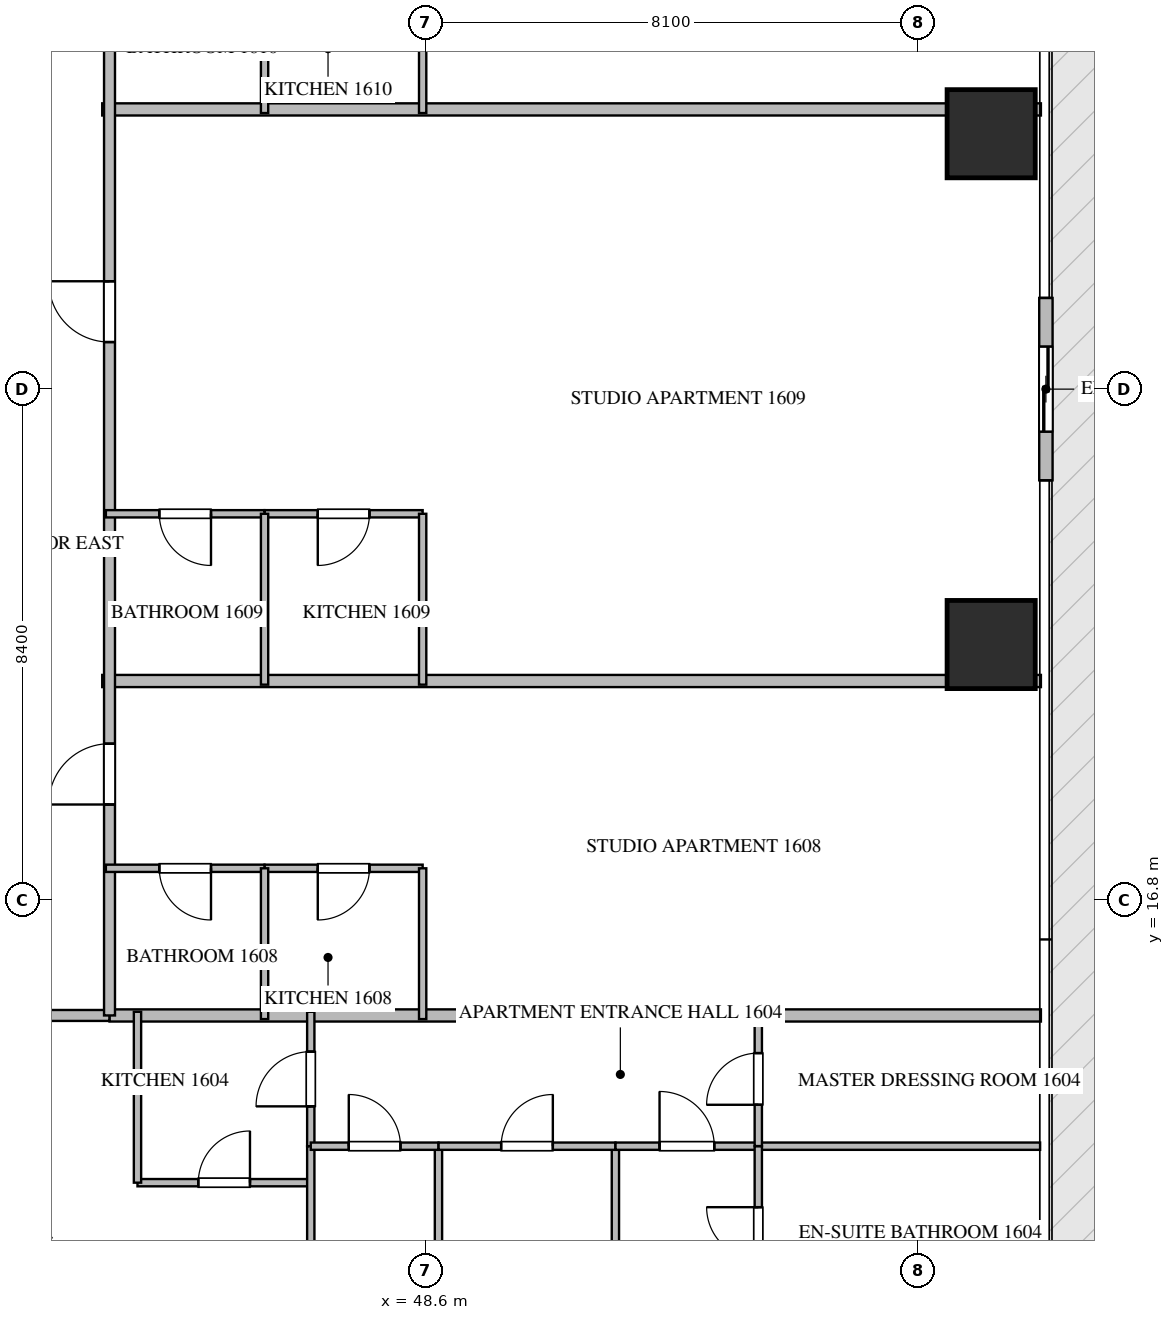
"""IFC4 building model, lengths in metres.
Left out: names, types, materials, properties, quantities, classifications, styles, units other than length and angle.
Written with IfcOpenShell. Run it as: python <this file> out.ifc"""

import sys

from ifc_helpers import new_model, si_unit, direction, frame, frame_2d, origin, origin_2d, place, context, subcontext, project, spatial, rectangle, extrude, source, transform, mapped, element, fill, save


model = new_model("IFC4")
c1 = context("Model", 3, precision=1e-05, world=origin(), true_north=direction((0.0, 1.0)))
c2 = subcontext(c1, "Body", "Model", "MODEL_VIEW")
j1 = project(units=[si_unit("LENGTHUNIT", "METRE"), si_unit("PLANEANGLEUNIT", "RADIAN")], contexts=[c1])
p1 = place(None, origin())
s1 = spatial("IfcSite", under=j1, at=p1, CompositionType="ELEMENT")
p2 = place(p1, origin())
s2 = spatial("IfcBuilding", under=s1, at=p2, CompositionType="ELEMENT")
p3 = place(p2, frame((0.0, 0.0, 67.95)))
s3 = spatial("IfcBuildingStorey", under=s2, at=p3, CompositionType="ELEMENT", Elevation=67.95)
m1 = source(origin(), c2, "Body", "SweptSolid", [
    extrude(rectangle(XDim=1.45, YDim=1.45, at=origin_2d()), origin(), (0.0, 0.0, 1.0), 3.75),
])
for number, where, z_axis, x_axis in (
    (1, (57.9, 21.0, -0.26), (0.0, 0.0, 1.0), (1.0, 0.0, 0.0)),
    (2, (57.9, 29.4, -0.26), (0.0, 0.0, 1.0), (1.0, 0.0, 0.0)),
):
    element("IfcColumn", number, at=place(p3, frame(where, z_axis=z_axis, x_axis=x_axis)), inside=s3, PredefinedType="COLUMN", context=c2, shape_type="MappedRepresentation", body=[
        mapped(m1, transform((0.0, 0.0, 0.0), scale=1.0)),
    ])
p4 = place(p3, frame((58.8, 23.7, 0.0), z_axis=(0.0, 0.0, 1.0), x_axis=(0.0, 1.0, 0.0)))
e3 = element("IfcWall", 3, at=p4, inside=s3, PredefinedType="ELEMENTEDWALL", context=c2, shape_type="SweptSolid", body=[
    extrude(rectangle(XDim=3.0, YDim=0.22, at=frame_2d((1.5, 0.0))), origin(), (0.0, 0.0, 1.0), 3.475),
])
p5 = place(p4, frame((0.8, 0.0, 0.0)))
e4 = element("IfcOpeningElement", 4, at=p5, cuts=e3, PredefinedType="OPENING", context=c2, shape_type="SweptSolid", body=[
    extrude(rectangle(XDim=1.4, YDim=2.25, at=frame_2d((0.7, 1.125))), frame((0.0, 0.12, 0.0), z_axis=(0.0, -1.0, 0.0), x_axis=(1.0, 0.0, 0.0)), (0.0, 0.0, 1.0), 0.24),
])
for number, where, z_axis, x_axis in (
    (5, (43.28, 20.4, 0.0), (0.0, 0.0, 1.0), (1.0, 0.0, 0.0)),
    (6, (43.28, 29.8, 0.0), (0.0, 0.0, 1.0), (1.0, 0.0, 0.0)),
):
    element("IfcWall", number, at=place(p3, frame(where, z_axis=z_axis, x_axis=x_axis)), inside=s3, PredefinedType="PARTITIONING", context=c2, shape_type="SweptSolid", body=[
        extrude(rectangle(XDim=15.438, YDim=0.2, at=frame_2d((7.719, 0.0))), origin(), (0.0, 0.0, 1.0), 3.49),
    ])
p6 = place(p3, frame((43.4, 14.9, 0.0), z_axis=(0.0, 0.0, 1.0), x_axis=(1.0, 0.0, 0.0)))
e7 = element("IfcWall", 7, at=p6, inside=s3, PredefinedType="PARTITIONING", context=c2, shape_type="SweptSolid", body=[
    extrude(rectangle(XDim=15.318, YDim=0.2, at=frame_2d((7.659, 0.0))), origin(), (0.0, 0.0, 1.0), 3.49),
])
p7 = place(p3, frame((21.402, 14.9, 0.0), z_axis=(0.0, 0.0, 1.0), x_axis=(1.0, 0.0, 0.0)))
e8 = element("IfcWall", 8, at=p7, inside=s3, PredefinedType="PARTITIONING", context=c2, shape_type="SweptSolid", body=[
    extrude(rectangle(XDim=21.996, YDim=0.18, at=frame_2d((10.998, 0.0))), origin(), (0.0, 0.0, 1.0), 3.49),
])
p8 = place(p7, frame((1.96, 0.0, 0.0)))
e9 = element("IfcOpeningElement", 9, at=p8, cuts=e8, PredefinedType="OPENING", context=c2, shape_type="SweptSolid", body=[
    extrude(rectangle(XDim=1.0, YDim=2.15, at=frame_2d((0.5, 1.075))), frame((0.0, 0.1, 0.0), z_axis=(0.0, -1.0, 0.0), x_axis=(1.0, 0.0, 0.0)), (0.0, 0.0, 1.0), 0.2),
])
p9 = place(p7, frame((5.249, 0.0, 0.0)))
e10 = element("IfcOpeningElement", 10, at=p9, cuts=e8, PredefinedType="OPENING", context=c2, shape_type="SweptSolid", body=[
    extrude(rectangle(XDim=1.0, YDim=2.15, at=frame_2d((0.5, 1.075))), frame((0.0, 0.1, 0.0), z_axis=(0.0, -1.0, 0.0), x_axis=(1.0, 0.0, 0.0)), (0.0, 0.0, 1.0), 0.2),
])
p10 = place(p7, frame((11.653, 0.0, 0.0)))
e11 = element("IfcOpeningElement", 11, at=p10, cuts=e8, PredefinedType="OPENING", context=c2, shape_type="SweptSolid", body=[
    extrude(rectangle(XDim=1.0, YDim=2.15, at=frame_2d((0.5, 1.075))), frame((0.0, 0.1, 0.0), z_axis=(0.0, -1.0, 0.0), x_axis=(1.0, 0.0, 0.0)), (0.0, 0.0, 1.0), 0.2),
])
p11 = place(p7, frame((18.896, 0.0, 0.0)))
e12 = element("IfcOpeningElement", 12, at=p11, cuts=e8, PredefinedType="OPENING", context=c2, shape_type="SweptSolid", body=[
    extrude(rectangle(XDim=1.0, YDim=2.15, at=frame_2d((0.5, 1.075))), frame((0.0, 0.1, 0.0), z_axis=(0.0, -1.0, 0.0), x_axis=(1.0, 0.0, 0.0)), (0.0, 0.0, 1.0), 0.2),
])
p12 = place(p3, frame((43.4, 14.9, 0.0), z_axis=(0.0, 0.0, 1.0), x_axis=(0.0, 1.0, 0.0)))
e13 = element("IfcWall", 13, at=p12, inside=s3, PredefinedType="PARTITIONING", context=c2, shape_type="SweptSolid", body=[
    extrude(rectangle(XDim=20.6, YDim=0.18, at=frame_2d((10.3, 0.0))), origin(), (0.0, 0.0, 1.0), 3.49),
])
p13 = place(p12, frame((3.469, 0.0, 0.0)))
e14 = element("IfcOpeningElement", 14, at=p13, cuts=e13, PredefinedType="OPENING", context=c2, shape_type="SweptSolid", body=[
    extrude(rectangle(XDim=1.0, YDim=2.15, at=frame_2d((0.5, 1.075))), frame((0.0, 0.1, 0.0), z_axis=(0.0, -1.0, 0.0), x_axis=(1.0, 0.0, 0.0)), (0.0, 0.0, 1.0), 0.2),
])
p14 = place(p12, frame((11.074, 0.0, 0.0)))
e15 = element("IfcOpeningElement", 15, at=p14, cuts=e13, PredefinedType="OPENING", context=c2, shape_type="SweptSolid", body=[
    extrude(rectangle(XDim=1.0, YDim=2.15, at=frame_2d((0.5, 1.075))), frame((0.0, 0.1, 0.0), z_axis=(0.0, -1.0, 0.0), x_axis=(1.0, 0.0, 0.0)), (0.0, 0.0, 1.0), 0.2),
])
p15 = place(p12, frame((17.78, 0.0, 0.0)))
e16 = element("IfcOpeningElement", 16, at=p15, cuts=e13, PredefinedType="OPENING", context=c2, shape_type="SweptSolid", body=[
    extrude(rectangle(XDim=1.0, YDim=2.15, at=frame_2d((0.5, 1.075))), frame((0.0, 0.1, 0.0), z_axis=(0.0, -1.0, 0.0), x_axis=(1.0, 0.0, 0.0)), (0.0, 0.0, 1.0), 0.2),
])
p16 = place(p3, frame((43.86, 12.15, 0.0), z_axis=(0.0, 0.0, 1.0), x_axis=(1.0, 0.0, 0.0)))
e17 = element("IfcWall", 17, at=p16, inside=s3, PredefinedType="PARTITIONING", context=c2, shape_type="SweptSolid", body=[
    extrude(rectangle(XDim=2.85, YDim=0.12, at=frame_2d((1.425, 0.0))), origin(), (0.0, 0.0, 1.0), 3.49),
])
p17 = place(p16, frame((1.0, 0.0, 0.0)))
e18 = element("IfcOpeningElement", 18, at=p17, cuts=e17, PredefinedType="OPENING", context=c2, shape_type="SweptSolid", body=[
    extrude(rectangle(XDim=0.85, YDim=2.1, at=frame_2d((0.425, 1.05))), frame((0.0, 0.07, 0.0), z_axis=(0.0, -1.0, 0.0), x_axis=(1.0, 0.0, 0.0)), (0.0, 0.0, 1.0), 0.14),
])
p18 = place(p3, frame((43.86, 12.15, 0.0), z_axis=(0.0, 0.0, 1.0), x_axis=(0.0, 1.0, 0.0)))
e19 = element("IfcWall", 19, at=p18, inside=s3, PredefinedType="PARTITIONING", context=c2, shape_type="SweptSolid", body=[
    extrude(rectangle(XDim=2.81, YDim=0.12, at=frame_2d((1.405, 0.0))), origin(), (0.0, 0.0, 1.0), 3.49),
])
p19 = place(p3, frame((46.71, 12.75, 0.0), z_axis=(0.0, 0.0, 1.0), x_axis=(0.0, 1.0, 0.0)))
e20 = element("IfcWall", 20, at=p19, inside=s3, PredefinedType="PARTITIONING", context=c2, shape_type="SweptSolid", body=[
    extrude(rectangle(XDim=2.21, YDim=0.12, at=frame_2d((1.105, 0.0))), origin(), (0.0, 0.0, 1.0), 3.49),
])
p20 = place(p19, frame((0.655, 0.0, 0.0)))
e21 = element("IfcOpeningElement", 21, at=p20, cuts=e20, PredefinedType="OPENING", context=c2, shape_type="SweptSolid", body=[
    extrude(rectangle(XDim=0.9, YDim=2.1, at=frame_2d((0.45, 1.05))), frame((0.0, 0.07, 0.0), z_axis=(0.0, -1.0, 0.0), x_axis=(1.0, 0.0, 0.0)), (0.0, 0.0, 1.0), 0.14),
])
p21 = place(p3, frame((46.71, 5.607, 0.0), z_axis=(0.0, 0.0, 1.0), x_axis=(0.0, 1.0, 0.0)))
e22 = element("IfcWall", 22, at=p21, inside=s3, PredefinedType="PARTITIONING", context=c2, shape_type="SweptSolid", body=[
    extrude(rectangle(XDim=7.141, YDim=0.12, at=frame_2d((3.571, 0.0))), origin(), (0.0, 0.0, 1.0), 3.49),
])
p22 = place(p3, frame((51.72, 4.495, 0.0), z_axis=(0.0, 0.0, 1.0), x_axis=(0.0, 1.0, 0.0)))
e23 = element("IfcWall", 23, at=p22, inside=s3, PredefinedType="PARTITIONING", context=c2, shape_type="SweptSolid", body=[
    extrude(rectangle(XDim=8.255, YDim=0.12, at=frame_2d((4.127, 0.0))), origin(), (0.0, 0.0, 1.0), 3.49),
])
p23 = place(p3, frame((48.81, 5.605, 0.0), z_axis=(0.0, 0.0, 1.0), x_axis=(0.0, 1.0, 0.0)))
e24 = element("IfcWall", 24, at=p23, inside=s3, PredefinedType="PARTITIONING", context=c2, shape_type="SweptSolid", body=[
    extrude(rectangle(XDim=7.145, YDim=0.12, at=frame_2d((3.573, 0.0))), origin(), (0.0, 0.0, 1.0), 3.49),
])
p24 = place(p3, frame((46.71, 12.75, 0.0), z_axis=(0.0, 0.0, 1.0), x_axis=(1.0, 0.0, 0.0)))
e25 = element("IfcWall", 25, at=p24, inside=s3, PredefinedType="PARTITIONING", context=c2, shape_type="SweptSolid", body=[
    extrude(rectangle(XDim=2.1, YDim=0.12, at=frame_2d((1.05, 0.0))), origin(), (0.0, 0.0, 1.0), 3.49),
])
p25 = place(p24, frame((0.625, 0.0, 0.0)))
e26 = element("IfcOpeningElement", 26, at=p25, cuts=e25, PredefinedType="OPENING", context=c2, shape_type="SweptSolid", body=[
    extrude(rectangle(XDim=0.85, YDim=2.1, at=frame_2d((0.425, 1.05))), frame((0.0, 0.07, 0.0), z_axis=(0.0, -1.0, 0.0), x_axis=(1.0, 0.0, 0.0)), (0.0, 0.0, 1.0), 0.14),
])
p26 = place(p3, frame((48.812, 12.75, 0.0), z_axis=(0.0, 0.0, 1.0), x_axis=(1.0, 0.0, 0.0)))
e27 = element("IfcWall", 27, at=p26, inside=s3, PredefinedType="PARTITIONING", context=c2, shape_type="SweptSolid", body=[
    extrude(rectangle(XDim=2.908, YDim=0.12, at=frame_2d((1.454, 0.0))), origin(), (0.0, 0.0, 1.0), 3.49),
])
p27 = place(p26, frame((1.029, 0.0, 0.0)))
e28 = element("IfcOpeningElement", 28, at=p27, cuts=e27, PredefinedType="OPENING", context=c2, shape_type="SweptSolid", body=[
    extrude(rectangle(XDim=0.85, YDim=2.1, at=frame_2d((0.425, 1.05))), frame((0.0, 0.07, 0.0), z_axis=(0.0, -1.0, 0.0), x_axis=(1.0, 0.0, 0.0)), (0.0, 0.0, 1.0), 0.14),
])
p28 = place(p3, frame((51.722, 12.75, 0.0), z_axis=(0.0, 0.0, 1.0), x_axis=(1.0, 0.0, 0.0)))
e29 = element("IfcWall", 29, at=p28, inside=s3, PredefinedType="PARTITIONING", context=c2, shape_type="SweptSolid", body=[
    extrude(rectangle(XDim=2.348, YDim=0.12, at=frame_2d((1.174, 0.0))), origin(), (0.0, 0.0, 1.0), 3.49),
])
p29 = place(p28, frame((0.724, 0.0, 0.0)))
e30 = element("IfcOpeningElement", 30, at=p29, cuts=e29, PredefinedType="OPENING", context=c2, shape_type="SweptSolid", body=[
    extrude(rectangle(XDim=0.9, YDim=2.1, at=frame_2d((0.45, 1.05))), frame((0.0, 0.07, 0.0), z_axis=(0.0, -1.0, 0.0), x_axis=(1.0, 0.0, 0.0)), (0.0, 0.0, 1.0), 0.14),
])
p30 = place(p3, frame((54.072, 12.75, 0.0), z_axis=(0.0, 0.0, 1.0), x_axis=(1.0, 0.0, 0.0)))
e31 = element("IfcWall", 31, at=p30, inside=s3, PredefinedType="PARTITIONING", context=c2, shape_type="SweptSolid", body=[
    extrude(rectangle(XDim=4.633, YDim=0.12, at=frame_2d((2.316, 0.0))), origin(), (0.0, 0.0, 1.0), 3.49),
])
p31 = place(p3, frame((54.07, 9.894, 0.0), z_axis=(0.0, 0.0, 1.0), x_axis=(0.0, 1.0, 0.0)))
e32 = element("IfcWall", 32, at=p31, inside=s3, PredefinedType="PARTITIONING", context=c2, shape_type="SweptSolid", body=[
    extrude(rectangle(XDim=2.856, YDim=0.12, at=frame_2d((1.428, 0.0))), origin(), (0.0, 0.0, 1.0), 3.49),
])
p32 = place(p31, frame((1.003, 0.0, 0.0)))
e33 = element("IfcOpeningElement", 33, at=p32, cuts=e32, PredefinedType="OPENING", context=c2, shape_type="SweptSolid", body=[
    extrude(rectangle(XDim=0.85, YDim=2.1, at=frame_2d((0.425, 1.05))), frame((0.0, 0.07, 0.0), z_axis=(0.0, -1.0, 0.0), x_axis=(1.0, 0.0, 0.0)), (0.0, 0.0, 1.0), 0.14),
])
p33 = place(p3, frame((54.07, 12.752, 0.0), z_axis=(0.0, 0.0, 1.0), x_axis=(0.0, 1.0, 0.0)))
e34 = element("IfcWall", 34, at=p33, inside=s3, PredefinedType="PARTITIONING", context=c2, shape_type="SweptSolid", body=[
    extrude(rectangle(XDim=2.208, YDim=0.12, at=frame_2d((1.104, 0.0))), origin(), (0.0, 0.0, 1.0), 3.49),
])
p34 = place(p33, frame((0.679, 0.0, 0.0)))
e35 = element("IfcOpeningElement", 35, at=p34, cuts=e34, PredefinedType="OPENING", context=c2, shape_type="SweptSolid", body=[
    extrude(rectangle(XDim=0.85, YDim=2.1, at=frame_2d((0.425, 1.05))), frame((0.0, 0.07, 0.0), z_axis=(0.0, -1.0, 0.0), x_axis=(1.0, 0.0, 0.0)), (0.0, 0.0, 1.0), 0.14),
])
p35 = place(p3, frame((48.55, 17.32, 0.0), z_axis=(0.0, 0.0, 1.0), x_axis=(-1.0, 0.0, 0.0)))
e36 = element("IfcWall", 36, at=p35, inside=s3, PredefinedType="PARTITIONING", context=c2, shape_type="SweptSolid", body=[
    extrude(rectangle(XDim=2.6, YDim=0.12, at=frame_2d((1.3, 0.0))), origin(), (0.0, 0.0, 1.0), 3.49),
])
p36 = place(p35, frame((0.875, 0.0, 0.0)))
e37 = element("IfcOpeningElement", 37, at=p36, cuts=e36, PredefinedType="OPENING", context=c2, shape_type="SweptSolid", body=[
    extrude(rectangle(XDim=0.85, YDim=2.1, at=frame_2d((0.425, 1.05))), frame((0.0, 0.07, 0.0), z_axis=(0.0, -1.0, 0.0), x_axis=(1.0, 0.0, 0.0)), (0.0, 0.0, 1.0), 0.14),
])
p37 = place(p3, frame((45.948, 17.32, 0.0), z_axis=(0.0, 0.0, 1.0), x_axis=(-1.0, 0.0, 0.0)))
e38 = element("IfcWall", 38, at=p37, inside=s3, PredefinedType="PARTITIONING", context=c2, shape_type="SweptSolid", body=[
    extrude(rectangle(XDim=2.608, YDim=0.12, at=frame_2d((1.304, 0.0))), origin(), (0.0, 0.0, 1.0), 3.49),
])
p38 = place(p37, frame((0.879, 0.0, 0.0)))
e39 = element("IfcOpeningElement", 39, at=p38, cuts=e38, PredefinedType="OPENING", context=c2, shape_type="SweptSolid", body=[
    extrude(rectangle(XDim=0.85, YDim=2.1, at=frame_2d((0.425, 1.05))), frame((0.0, 0.07, 0.0), z_axis=(0.0, -1.0, 0.0), x_axis=(1.0, 0.0, 0.0)), (0.0, 0.0, 1.0), 0.14),
])
for number, where, z_axis, x_axis in (
    (40, (45.95, 14.84, 0.0), (0.0, 0.0, 1.0), (0.0, 1.0, 0.0)),
    (41, (48.55, 14.84, 0.0), (0.0, 0.0, 1.0), (0.0, 1.0, 0.0)),
):
    element("IfcWall", number, at=place(p3, frame(where, z_axis=z_axis, x_axis=x_axis)), inside=s3, PredefinedType="PARTITIONING", context=c2, shape_type="SweptSolid", body=[
        extrude(rectangle(XDim=2.48, YDim=0.12, at=frame_2d((1.24, 0.0))), origin(), (0.0, 0.0, 1.0), 3.49),
    ])
p39 = place(p3, frame((48.55, 23.15, 0.0), z_axis=(0.0, 0.0, 1.0), x_axis=(-1.0, 0.0, 0.0)))
e42 = element("IfcWall", 42, at=p39, inside=s3, PredefinedType="PARTITIONING", context=c2, shape_type="SweptSolid", body=[
    extrude(rectangle(XDim=2.6, YDim=0.12, at=frame_2d((1.3, 0.0))), origin(), (0.0, 0.0, 1.0), 3.49),
])
p40 = place(p39, frame((0.875, 0.0, 0.0)))
e43 = element("IfcOpeningElement", 43, at=p40, cuts=e42, PredefinedType="OPENING", context=c2, shape_type="SweptSolid", body=[
    extrude(rectangle(XDim=0.85, YDim=2.1, at=frame_2d((0.425, 1.05))), frame((0.0, 0.07, 0.0), z_axis=(0.0, -1.0, 0.0), x_axis=(1.0, 0.0, 0.0)), (0.0, 0.0, 1.0), 0.14),
])
p41 = place(p3, frame((45.948, 23.15, 0.0), z_axis=(0.0, 0.0, 1.0), x_axis=(-1.0, 0.0, 0.0)))
e44 = element("IfcWall", 44, at=p41, inside=s3, PredefinedType="PARTITIONING", context=c2, shape_type="SweptSolid", body=[
    extrude(rectangle(XDim=2.608, YDim=0.12, at=frame_2d((1.304, 0.0))), origin(), (0.0, 0.0, 1.0), 3.49),
])
p42 = place(p41, frame((0.879, 0.0, 0.0)))
e45 = element("IfcOpeningElement", 45, at=p42, cuts=e44, PredefinedType="OPENING", context=c2, shape_type="SweptSolid", body=[
    extrude(rectangle(XDim=0.85, YDim=2.1, at=frame_2d((0.425, 1.05))), frame((0.0, 0.07, 0.0), z_axis=(0.0, -1.0, 0.0), x_axis=(1.0, 0.0, 0.0)), (0.0, 0.0, 1.0), 0.14),
])
for number, where, z_axis, x_axis in (
    (46, (45.95, 20.34, 0.0), (0.0, 0.0, 1.0), (0.0, 1.0, 0.0)),
    (47, (48.55, 20.34, 0.0), (0.0, 0.0, 1.0), (0.0, 1.0, 0.0)),
):
    element("IfcWall", number, at=place(p3, frame(where, z_axis=z_axis, x_axis=x_axis)), inside=s3, PredefinedType="PARTITIONING", context=c2, shape_type="SweptSolid", body=[
        extrude(rectangle(XDim=2.81, YDim=0.12, at=frame_2d((1.405, 0.0))), origin(), (0.0, 0.0, 1.0), 3.49),
    ])
for number, where, z_axis, x_axis in (
    (48, (45.95, 29.74, 0.0), (0.0, 0.0, 1.0), (0.0, 1.0, 0.0)),
    (49, (48.55, 29.74, 0.0), (0.0, 0.0, 1.0), (0.0, 1.0, 0.0)),
):
    element("IfcWall", number, at=place(p3, frame(where, z_axis=z_axis, x_axis=x_axis)), inside=s3, PredefinedType="PARTITIONING", context=c2, shape_type="SweptSolid", body=[
        extrude(rectangle(XDim=2.57, YDim=0.12, at=frame_2d((1.285, 0.0))), origin(), (0.0, 0.0, 1.0), 3.49),
    ])
m2 = source(origin(), c2, "Body", "SweptSolid", [
    extrude(rectangle(XDim=1.4, YDim=2.25, at=frame_2d((0.7, 1.125))), frame((0.0, 0.025, 0.0), z_axis=(0.0, -1.0, 0.0), x_axis=(1.0, 0.0, 0.0)), (0.0, 0.0, 1.0), 0.05),
])
p43 = place(p5, origin())
e50 = element("IfcDoor", 50, at=p43, inside=s3, OperationType="SLIDING_TO_LEFT", PredefinedType="DOOR", context=c2, shape_type="MappedRepresentation", body=[
    mapped(m2, transform((0.0, 0.0, 0.0), scale=1.0)),
])
fill(e4, e50)
m3 = source(origin(), c2, "Body", "SweptSolid", [
    extrude(rectangle(XDim=1.0, YDim=2.15, at=frame_2d((0.5, 1.075))), frame((0.0, 0.025, 0.0), z_axis=(0.0, -1.0, 0.0), x_axis=(1.0, 0.0, 0.0)), (0.0, 0.0, 1.0), 0.05),
])
p44 = place(p13, origin())
e51 = element("IfcDoor", 51, at=p44, inside=s3, OperationType="SINGLE_SWING_LEFT", PredefinedType="DOOR", context=c2, shape_type="MappedRepresentation", body=[
    mapped(m3, transform((0.0, 0.0, 0.0), scale=1.0)),
])
fill(e14, e51)
p45 = place(p14, origin())
e52 = element("IfcDoor", 52, at=p45, inside=s3, OperationType="SINGLE_SWING_RIGHT", PredefinedType="DOOR", context=c2, shape_type="MappedRepresentation", body=[
    mapped(m3, transform((0.0, 0.0, 0.0), scale=1.0)),
])
fill(e15, e52)
m4 = source(origin(), c2, "Body", "SweptSolid", [
    extrude(rectangle(XDim=0.85, YDim=2.1, at=frame_2d((0.425, 1.05))), frame((0.0, 0.025, 0.0), z_axis=(0.0, -1.0, 0.0), x_axis=(1.0, 0.0, 0.0)), (0.0, 0.0, 1.0), 0.05),
])
p46 = place(p17, origin())
e53 = element("IfcDoor", 53, at=p46, inside=s3, OperationType="SINGLE_SWING_RIGHT", PredefinedType="DOOR", context=c2, shape_type="MappedRepresentation", body=[
    mapped(m4, transform((0.0, 0.0, 0.0), scale=1.0)),
])
fill(e18, e53)
m5 = source(origin(), c2, "Body", "SweptSolid", [
    extrude(rectangle(XDim=0.9, YDim=2.1, at=frame_2d((0.45, 1.05))), frame((0.0, 0.025, 0.0), z_axis=(0.0, -1.0, 0.0), x_axis=(1.0, 0.0, 0.0)), (0.0, 0.0, 1.0), 0.05),
])
p47 = place(p20, origin())
e54 = element("IfcDoor", 54, at=p47, inside=s3, OperationType="SINGLE_SWING_LEFT", PredefinedType="DOOR", context=c2, shape_type="MappedRepresentation", body=[
    mapped(m5, transform((0.0, 0.0, 0.0), scale=1.0)),
])
fill(e21, e54)
p48 = place(p25, origin())
e55 = element("IfcDoor", 55, at=p48, inside=s3, OperationType="SINGLE_SWING_LEFT", PredefinedType="DOOR", context=c2, shape_type="MappedRepresentation", body=[
    mapped(m4, transform((0.0, 0.0, 0.0), scale=1.0)),
])
fill(e26, e55)
p49 = place(p27, origin())
e56 = element("IfcDoor", 56, at=p49, inside=s3, OperationType="SINGLE_SWING_RIGHT", PredefinedType="DOOR", context=c2, shape_type="MappedRepresentation", body=[
    mapped(m4, transform((0.0, 0.0, 0.0), scale=1.0)),
])
fill(e28, e56)
p50 = place(p29, origin())
e57 = element("IfcDoor", 57, at=p50, inside=s3, OperationType="SINGLE_SWING_LEFT", PredefinedType="DOOR", context=c2, shape_type="MappedRepresentation", body=[
    mapped(m5, transform((0.0, 0.0, 0.0), scale=1.0)),
])
fill(e30, e57)
p51 = place(p32, origin())
e58 = element("IfcDoor", 58, at=p51, inside=s3, OperationType="SINGLE_SWING_RIGHT", PredefinedType="DOOR", context=c2, shape_type="MappedRepresentation", body=[
    mapped(m4, transform((0.0, 0.0, 0.0), scale=1.0)),
])
fill(e33, e58)
p52 = place(p34, origin())
e59 = element("IfcDoor", 59, at=p52, inside=s3, OperationType="SINGLE_SWING_LEFT", PredefinedType="DOOR", context=c2, shape_type="MappedRepresentation", body=[
    mapped(m4, transform((0.0, 0.0, 0.0), scale=1.0)),
])
fill(e35, e59)
p53 = place(p36, origin())
e60 = element("IfcDoor", 60, at=p53, inside=s3, OperationType="SINGLE_SWING_RIGHT", PredefinedType="DOOR", context=c2, shape_type="MappedRepresentation", body=[
    mapped(m4, transform((0.0, 0.0, 0.0), scale=1.0)),
])
fill(e37, e60)
p54 = place(p38, origin())
e61 = element("IfcDoor", 61, at=p54, inside=s3, OperationType="SINGLE_SWING_LEFT", PredefinedType="DOOR", context=c2, shape_type="MappedRepresentation", body=[
    mapped(m4, transform((0.0, 0.0, 0.0), scale=1.0)),
])
fill(e39, e61)
p55 = place(p40, origin())
e62 = element("IfcDoor", 62, at=p55, inside=s3, OperationType="SINGLE_SWING_RIGHT", PredefinedType="DOOR", context=c2, shape_type="MappedRepresentation", body=[
    mapped(m4, transform((0.0, 0.0, 0.0), scale=1.0)),
])
fill(e43, e62)
p56 = place(p42, origin())
e63 = element("IfcDoor", 63, at=p56, inside=s3, OperationType="SINGLE_SWING_LEFT", PredefinedType="DOOR", context=c2, shape_type="MappedRepresentation", body=[
    mapped(m4, transform((0.0, 0.0, 0.0), scale=1.0)),
])
fill(e45, e63)
save(model, sys.argv[1])
